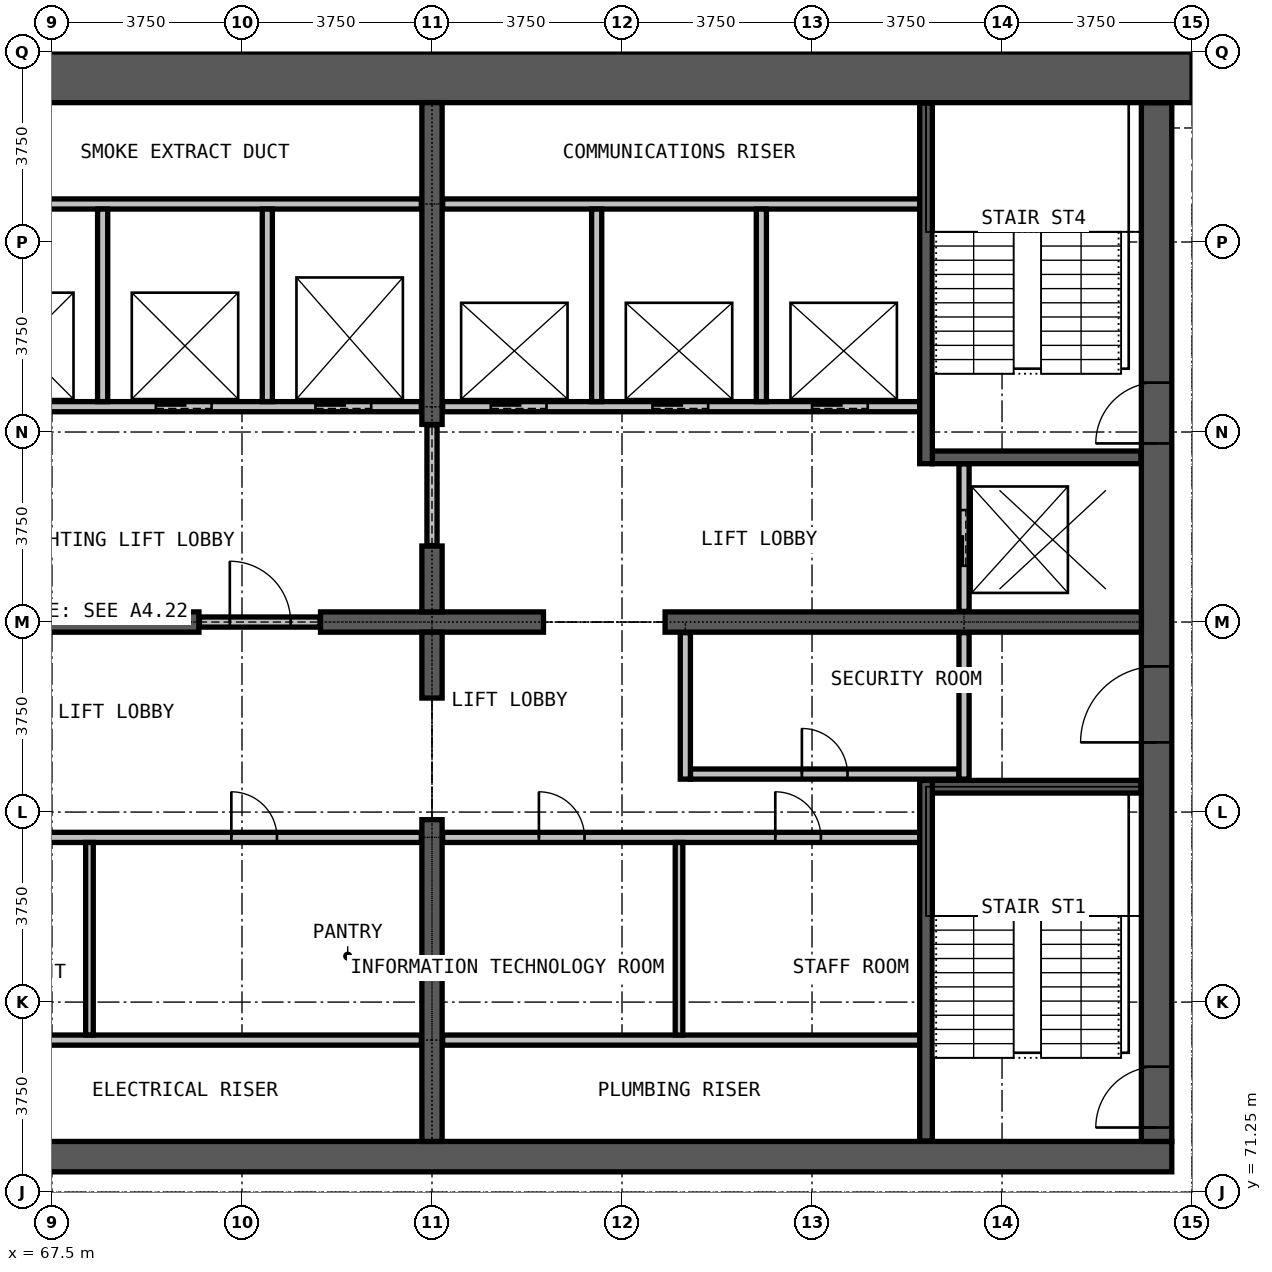
"""IFC4 building model, lengths in metres.
Left out: names, types, materials, properties, quantities, classifications, styles, units other than length and angle.
Written with IfcOpenShell. Run it as: python <this file> out.ifc"""

import sys

from ifc_helpers import new_model, si_unit, direction, frame, frame_2d, origin, place, context, subcontext, project, spatial, rectangle, extrude, element, fill, save


model = new_model("IFC4")
c1 = context("Model", 3, precision=1e-05, world=origin(), true_north=direction((0.0, 1.0)))
c2 = subcontext(c1, "Body", "Model", "MODEL_VIEW")
j1 = project(units=[si_unit("LENGTHUNIT", "METRE"), si_unit("PLANEANGLEUNIT", "RADIAN")], contexts=[c1])
p1 = place(None, origin())
s1 = spatial("IfcSite", under=j1, at=p1, CompositionType="ELEMENT")
p2 = place(p1, origin())
s2 = spatial("IfcBuilding", under=s1, at=p2, CompositionType="ELEMENT")
p3 = place(p2, frame((0.0, 0.0, 213.9)))
s3 = spatial("IfcBuildingStorey", under=s2, at=p3, CompositionType="ELEMENT", Elevation=213.9)
p4 = place(p3, frame((60.4, 71.95, 0.0), z_axis=(0.0, 0.0, 1.0), x_axis=(1.0, 0.0, 0.0)))
e1 = element("IfcWall", 1, at=p4, inside=s3, PredefinedType="SHEAR", context=c2, shape_type="SweptSolid", body=[
    extrude(rectangle(XDim=29.2, YDim=0.6, at=frame_2d((14.6, 0.0))), origin(), (0.0, 0.0, 1.0), 3.6),
])
p5 = place(p3, frame((89.3, 72.25, 0.0), z_axis=(0.0, 0.0, 1.0), x_axis=(0.0, 1.0, 0.0)))
e2 = element("IfcWall", 2, at=p5, inside=s3, PredefinedType="SHEAR", context=c2, shape_type="SweptSolid", body=[
    extrude(rectangle(XDim=20.5, YDim=0.6, at=frame_2d((10.25, 0.0))), origin(), (0.0, 0.0, 1.0), 3.6),
])
p6 = place(p5, frame((0.275, 0.0, 0.0)))
e3 = element("IfcOpeningElement", 3, at=p6, cuts=e2, PredefinedType="OPENING", context=c2, shape_type="SweptSolid", body=[
    extrude(rectangle(XDim=1.2, YDim=2.2, at=frame_2d((0.6, 1.1))), frame((0.0, 0.31, 0.0), z_axis=(0.0, -1.0, 0.0), x_axis=(1.0, 0.0, 0.0)), (0.0, 0.0, 1.0), 0.62),
])
p7 = place(p5, frame((13.775, 0.0, 0.0)))
e4 = element("IfcOpeningElement", 4, at=p7, cuts=e2, PredefinedType="OPENING", context=c2, shape_type="SweptSolid", body=[
    extrude(rectangle(XDim=1.2, YDim=2.2, at=frame_2d((0.6, 1.1))), frame((0.0, 0.31, 0.0), z_axis=(0.0, -1.0, 0.0), x_axis=(1.0, 0.0, 0.0)), (0.0, 0.0, 1.0), 0.62),
])
p8 = place(p5, frame((7.875, 0.0, 0.0)))
e5 = element("IfcOpeningElement", 5, at=p8, cuts=e2, PredefinedType="OPENING", context=c2, shape_type="SweptSolid", body=[
    extrude(rectangle(XDim=1.5, YDim=2.2, at=frame_2d((0.75, 1.1))), frame((0.0, 0.31, 0.0), z_axis=(0.0, -1.0, 0.0), x_axis=(1.0, 0.0, 0.0)), (0.0, 0.0, 1.0), 0.62),
])
p9 = place(p3, frame((90.0, 93.25, 0.0), z_axis=(0.0, 0.0, 1.0), x_axis=(-1.0, 0.0, 0.0)))
e6 = element("IfcWall", 6, at=p9, inside=s3, PredefinedType="SHEAR", context=c2, shape_type="SweptSolid", body=[
    extrude(rectangle(XDim=30.0, YDim=1.0, at=frame_2d((15.0, 0.0))), origin(), (0.0, 0.0, 1.0), 3.6),
])
p10 = place(p3, frame((61.0, 82.5, 0.0), z_axis=(0.0, 0.0, 1.0), x_axis=(1.0, 0.0, 0.0)))
e7 = element("IfcWall", 7, at=p10, inside=s3, PredefinedType="SHEAR", context=c2, shape_type="SweptSolid", body=[
    extrude(rectangle(XDim=9.4, YDim=0.4, at=frame_2d((4.7, 0.0))), origin(), (0.0, 0.0, 1.0), 3.6),
])
p11 = place(p3, frame((72.8, 82.5, 0.0), z_axis=(0.0, 0.0, 1.0), x_axis=(1.0, 0.0, 0.0)))
e8 = element("IfcWall", 8, at=p11, inside=s3, PredefinedType="SHEAR", context=c2, shape_type="SweptSolid", body=[
    extrude(rectangle(XDim=4.4, YDim=0.4, at=frame_2d((2.2, 0.0))), origin(), (0.0, 0.0, 1.0), 3.6),
])
p12 = place(p3, frame((79.6, 82.5, 0.0), z_axis=(0.0, 0.0, 1.0), x_axis=(1.0, 0.0, 0.0)))
e9 = element("IfcWall", 9, at=p12, inside=s3, PredefinedType="SHEAR", context=c2, shape_type="SweptSolid", body=[
    extrude(rectangle(XDim=9.4, YDim=0.4, at=frame_2d((4.7, 0.0))), origin(), (0.0, 0.0, 1.0), 3.6),
])
p13 = place(p3, frame((75.0, 72.25, 0.0), z_axis=(0.0, 0.0, 1.0), x_axis=(0.0, 1.0, 0.0)))
e10 = element("IfcWall", 10, at=p13, inside=s3, PredefinedType="SHEAR", context=c2, shape_type="SweptSolid", body=[
    extrude(rectangle(XDim=6.35, YDim=0.4, at=frame_2d((3.175, 0.0))), origin(), (0.0, 0.0, 1.0), 3.6),
])
for number, where, z_axis, x_axis in (
    (11, (75.0, 81.0, 0.0), (0.0, 0.0, 1.0), (0.0, 1.0, 0.0)),
    (12, (75.0, 82.7, 0.0), (0.0, 0.0, 1.0), (0.0, 1.0, 0.0)),
):
    element("IfcWall", number, at=place(p3, frame(where, z_axis=z_axis, x_axis=x_axis)), inside=s3, PredefinedType="SHEAR", context=c2, shape_type="SweptSolid", body=[
        extrude(rectangle(XDim=1.3, YDim=0.4, at=frame_2d((0.65, 0.0))), origin(), (0.0, 0.0, 1.0), 3.6),
    ])
p14 = place(p3, frame((75.0, 86.4, 0.0), z_axis=(0.0, 0.0, 1.0), x_axis=(0.0, 1.0, 0.0)))
e13 = element("IfcWall", 13, at=p14, inside=s3, PredefinedType="SHEAR", context=c2, shape_type="SweptSolid", body=[
    extrude(rectangle(XDim=6.35, YDim=0.4, at=frame_2d((3.175, 0.0))), origin(), (0.0, 0.0, 1.0), 3.6),
])
for number, where, z_axis, x_axis in (
    (14, (65.375, 74.25, 0.0), (0.0, 0.0, 1.0), (1.0, 0.0, 0.0)),
    (15, (75.21, 74.25, 0.0), (0.0, 0.0, 1.0), (1.0, 0.0, 0.0)),
):
    element("IfcWall", number, at=place(p3, frame(where, z_axis=z_axis, x_axis=x_axis)), inside=s3, PredefinedType="PARTITIONING", context=c2, shape_type="SweptSolid", body=[
        extrude(rectangle(XDim=9.415, YDim=0.2, at=frame_2d((4.708, 0.0))), origin(), (0.0, 0.0, 1.0), 3.3),
    ])
p15 = place(p3, frame((65.375, 78.25, 0.0), z_axis=(0.0, 0.0, 1.0), x_axis=(1.0, 0.0, 0.0)))
e16 = element("IfcWall", 16, at=p15, inside=s3, PredefinedType="PARTITIONING", context=c2, shape_type="SweptSolid", body=[
    extrude(rectangle(XDim=9.415, YDim=0.2, at=frame_2d((4.708, 0.0))), origin(), (0.0, 0.0, 1.0), 3.3),
])
p16 = place(p15, frame((1.0, 0.0, 0.0)))
e17 = element("IfcOpeningElement", 17, at=p16, cuts=e16, PredefinedType="OPENING", context=c2, shape_type="SweptSolid", body=[
    extrude(rectangle(XDim=0.9, YDim=2.2, at=frame_2d((0.45, 1.1))), frame((0.0, 0.11, 0.0), z_axis=(0.0, -1.0, 0.0), x_axis=(1.0, 0.0, 0.0)), (0.0, 0.0, 1.0), 0.22),
])
p17 = place(p15, frame((5.665, 0.0, 0.0)))
e18 = element("IfcOpeningElement", 18, at=p17, cuts=e16, PredefinedType="OPENING", context=c2, shape_type="SweptSolid", body=[
    extrude(rectangle(XDim=0.9, YDim=2.2, at=frame_2d((0.45, 1.1))), frame((0.0, 0.11, 0.0), z_axis=(0.0, -1.0, 0.0), x_axis=(1.0, 0.0, 0.0)), (0.0, 0.0, 1.0), 0.22),
])
p18 = place(p3, frame((75.21, 78.25, 0.0), z_axis=(0.0, 0.0, 1.0), x_axis=(1.0, 0.0, 0.0)))
e19 = element("IfcWall", 19, at=p18, inside=s3, PredefinedType="PARTITIONING", context=c2, shape_type="SweptSolid", body=[
    extrude(rectangle(XDim=9.415, YDim=0.2, at=frame_2d((4.708, 0.0))), origin(), (0.0, 0.0, 1.0), 3.3),
])
p19 = place(p18, frame((1.9, 0.0, 0.0)))
e20 = element("IfcOpeningElement", 20, at=p19, cuts=e19, PredefinedType="OPENING", context=c2, shape_type="SweptSolid", body=[
    extrude(rectangle(XDim=0.9, YDim=2.2, at=frame_2d((0.45, 1.1))), frame((0.0, 0.11, 0.0), z_axis=(0.0, -1.0, 0.0), x_axis=(1.0, 0.0, 0.0)), (0.0, 0.0, 1.0), 0.22),
])
p20 = place(p18, frame((6.565, 0.0, 0.0)))
e21 = element("IfcOpeningElement", 21, at=p20, cuts=e19, PredefinedType="OPENING", context=c2, shape_type="SweptSolid", body=[
    extrude(rectangle(XDim=0.9, YDim=2.2, at=frame_2d((0.45, 1.1))), frame((0.0, 0.11, 0.0), z_axis=(0.0, -1.0, 0.0), x_axis=(1.0, 0.0, 0.0)), (0.0, 0.0, 1.0), 0.22),
])
p21 = place(p3, frame((80.1, 79.5, 0.0), z_axis=(0.0, 0.0, 1.0), x_axis=(1.0, 0.0, 0.0)))
e22 = element("IfcWall", 22, at=p21, inside=s3, PredefinedType="PARTITIONING", context=c2, shape_type="SweptSolid", body=[
    extrude(rectangle(XDim=5.3, YDim=0.2, at=frame_2d((2.65, 0.0))), origin(), (0.0, 0.0, 1.0), 3.3),
])
p22 = place(p21, frame((2.2, 0.0, 0.0)))
e23 = element("IfcOpeningElement", 23, at=p22, cuts=e22, PredefinedType="OPENING", context=c2, shape_type="SweptSolid", body=[
    extrude(rectangle(XDim=0.9, YDim=2.2, at=frame_2d((0.45, 1.1))), frame((0.0, 0.11, 0.0), z_axis=(0.0, -1.0, 0.0), x_axis=(1.0, 0.0, 0.0)), (0.0, 0.0, 1.0), 0.22),
])
p23 = place(p3, frame((70.41, 82.5, 0.0), z_axis=(0.0, 0.0, 1.0), x_axis=(1.0, 0.0, 0.0)))
e24 = element("IfcWall", 24, at=p23, inside=s3, PredefinedType="PARTITIONING", context=c2, shape_type="SweptSolid", body=[
    extrude(rectangle(XDim=2.38, YDim=0.2, at=frame_2d((1.19, 0.0))), origin(), (0.0, 0.0, 1.0), 2.4),
])
p24 = place(p23, frame((0.6, 0.0, 0.0)))
e25 = element("IfcOpeningElement", 25, at=p24, cuts=e24, PredefinedType="OPENING", context=c2, shape_type="SweptSolid", body=[
    extrude(rectangle(XDim=1.2, YDim=2.2, at=frame_2d((0.6, 1.1))), frame((0.0, 0.11, 0.0), z_axis=(0.0, -1.0, 0.0), x_axis=(1.0, 0.0, 0.0)), (0.0, 0.0, 1.0), 0.22),
])
p25 = place(p3, frame((75.0, 84.01, 0.0), z_axis=(0.0, 0.0, 1.0), x_axis=(0.0, 1.0, 0.0)))
e26 = element("IfcWall", 26, at=p25, inside=s3, PredefinedType="PARTITIONING", context=c2, shape_type="SweptSolid", body=[
    extrude(rectangle(XDim=2.38, YDim=0.2, at=frame_2d((1.19, 0.0))), origin(), (0.0, 0.0, 1.0), 2.4),
])
for number, where, z_axis, x_axis in (
    (27, (80.0, 79.4, 0.0), (0.0, 0.0, 1.0), (0.0, 1.0, 0.0)),
    (28, (85.5, 79.4, 0.0), (0.0, 0.0, 1.0), (0.0, 1.0, 0.0)),
):
    element("IfcWall", number, at=place(p3, frame(where, z_axis=z_axis, x_axis=x_axis)), inside=s3, PredefinedType="PARTITIONING", context=c2, shape_type="SweptSolid", body=[
        extrude(rectangle(XDim=2.89, YDim=0.2, at=frame_2d((1.445, 0.0))), origin(), (0.0, 0.0, 1.0), 3.3),
    ])
for number, where, z_axis, x_axis in (
    (29, (68.24, 74.35, 0.0), (0.0, 0.0, 1.0), (0.0, 1.0, 0.0)),
    (30, (79.875, 74.35, 0.0), (0.0, 0.0, 1.0), (0.0, 1.0, 0.0)),
):
    element("IfcWall", number, at=place(p3, frame(where, z_axis=z_axis, x_axis=x_axis)), inside=s3, PredefinedType="PARTITIONING", context=c2, shape_type="SweptSolid", body=[
        extrude(rectangle(XDim=3.8, YDim=0.15, at=frame_2d((1.9, 0.0))), origin(), (0.0, 0.0, 1.0), 3.3),
    ])
p26 = place(p3, frame((65.375, 86.75, 0.0), z_axis=(0.0, 0.0, 1.0), x_axis=(1.0, 0.0, 0.0)))
e31 = element("IfcWall", 31, at=p26, inside=s3, PredefinedType="PARTITIONING", context=c2, shape_type="SweptSolid", body=[
    extrude(rectangle(XDim=9.415, YDim=0.2, at=frame_2d((4.708, 0.0))), origin(), (0.0, 0.0, 1.0), 3.3),
])
p27 = place(p26, frame((1.0, 0.0, 0.0)))
e32 = element("IfcOpeningElement", 32, at=p27, cuts=e31, PredefinedType="OPENING", context=c2, shape_type="SweptSolid", body=[
    extrude(rectangle(XDim=1.1, YDim=2.2, at=frame_2d((0.55, 1.1))), frame((0.0, 0.11, 0.0), z_axis=(0.0, -1.0, 0.0), x_axis=(1.0, 0.0, 0.0)), (0.0, 0.0, 1.0), 0.22),
])
p28 = place(p26, frame((4.175, 0.0, 0.0)))
e33 = element("IfcOpeningElement", 33, at=p28, cuts=e31, PredefinedType="OPENING", context=c2, shape_type="SweptSolid", body=[
    extrude(rectangle(XDim=1.1, YDim=2.2, at=frame_2d((0.55, 1.1))), frame((0.0, 0.11, 0.0), z_axis=(0.0, -1.0, 0.0), x_axis=(1.0, 0.0, 0.0)), (0.0, 0.0, 1.0), 0.22),
])
p29 = place(p26, frame((7.325, 0.0, 0.0)))
e34 = element("IfcOpeningElement", 34, at=p29, cuts=e31, PredefinedType="OPENING", context=c2, shape_type="SweptSolid", body=[
    extrude(rectangle(XDim=1.1, YDim=2.2, at=frame_2d((0.55, 1.1))), frame((0.0, 0.11, 0.0), z_axis=(0.0, -1.0, 0.0), x_axis=(1.0, 0.0, 0.0)), (0.0, 0.0, 1.0), 0.22),
])
p30 = place(p3, frame((75.21, 86.75, 0.0), z_axis=(0.0, 0.0, 1.0), x_axis=(1.0, 0.0, 0.0)))
e35 = element("IfcWall", 35, at=p30, inside=s3, PredefinedType="PARTITIONING", context=c2, shape_type="SweptSolid", body=[
    extrude(rectangle(XDim=9.415, YDim=0.2, at=frame_2d((4.708, 0.0))), origin(), (0.0, 0.0, 1.0), 3.3),
])
p31 = place(p30, frame((0.95, 0.0, 0.0)))
e36 = element("IfcOpeningElement", 36, at=p31, cuts=e35, PredefinedType="OPENING", context=c2, shape_type="SweptSolid", body=[
    extrude(rectangle(XDim=1.1, YDim=2.2, at=frame_2d((0.55, 1.1))), frame((0.0, 0.11, 0.0), z_axis=(0.0, -1.0, 0.0), x_axis=(1.0, 0.0, 0.0)), (0.0, 0.0, 1.0), 0.22),
])
p32 = place(p30, frame((4.14, 0.0, 0.0)))
e37 = element("IfcOpeningElement", 37, at=p32, cuts=e35, PredefinedType="OPENING", context=c2, shape_type="SweptSolid", body=[
    extrude(rectangle(XDim=1.1, YDim=2.2, at=frame_2d((0.55, 1.1))), frame((0.0, 0.11, 0.0), z_axis=(0.0, -1.0, 0.0), x_axis=(1.0, 0.0, 0.0)), (0.0, 0.0, 1.0), 0.22),
])
p33 = place(p30, frame((7.29, 0.0, 0.0)))
e38 = element("IfcOpeningElement", 38, at=p33, cuts=e35, PredefinedType="OPENING", context=c2, shape_type="SweptSolid", body=[
    extrude(rectangle(XDim=1.1, YDim=2.2, at=frame_2d((0.55, 1.1))), frame((0.0, 0.11, 0.0), z_axis=(0.0, -1.0, 0.0), x_axis=(1.0, 0.0, 0.0)), (0.0, 0.0, 1.0), 0.22),
])
for number, where, z_axis, x_axis in (
    (39, (65.375, 90.75, 0.0), (0.0, 0.0, 1.0), (1.0, 0.0, 0.0)),
    (40, (75.21, 90.75, 0.0), (0.0, 0.0, 1.0), (1.0, 0.0, 0.0)),
):
    element("IfcWall", number, at=place(p3, frame(where, z_axis=z_axis, x_axis=x_axis)), inside=s3, PredefinedType="PARTITIONING", context=c2, shape_type="SweptSolid", body=[
        extrude(rectangle(XDim=9.415, YDim=0.2, at=frame_2d((4.708, 0.0))), origin(), (0.0, 0.0, 1.0), 3.3),
    ])
for number, where, z_axis, x_axis in (
    (41, (68.5, 86.85, 0.0), (0.0, 0.0, 1.0), (0.0, 1.0, 0.0)),
    (42, (71.75, 86.85, 0.0), (0.0, 0.0, 1.0), (0.0, 1.0, 0.0)),
    (43, (78.25, 86.85, 0.0), (0.0, 0.0, 1.0), (0.0, 1.0, 0.0)),
    (44, (81.5, 86.85, 0.0), (0.0, 0.0, 1.0), (0.0, 1.0, 0.0)),
):
    element("IfcWall", number, at=place(p3, frame(where, z_axis=z_axis, x_axis=x_axis)), inside=s3, PredefinedType="PARTITIONING", context=c2, shape_type="SweptSolid", body=[
        extrude(rectangle(XDim=3.8, YDim=0.2, at=frame_2d((1.9, 0.0))), origin(), (0.0, 0.0, 1.0), 3.3),
    ])
p34 = place(p3, frame((85.5, 82.71, 0.0), z_axis=(0.0, 0.0, 1.0), x_axis=(0.0, 1.0, 0.0)))
e45 = element("IfcWall", 45, at=p34, inside=s3, PredefinedType="PARTITIONING", context=c2, shape_type="SweptSolid", body=[
    extrude(rectangle(XDim=2.915, YDim=0.2, at=frame_2d((1.458, 0.0))), origin(), (0.0, 0.0, 1.0), 3.3),
])
p35 = place(p34, frame((0.9, 0.0, 0.0)))
e46 = element("IfcOpeningElement", 46, at=p35, cuts=e45, PredefinedType="OPENING", context=c2, shape_type="SweptSolid", body=[
    extrude(rectangle(XDim=1.1, YDim=2.2, at=frame_2d((0.55, 1.1))), frame((0.0, 0.11, 0.0), z_axis=(0.0, -1.0, 0.0), x_axis=(1.0, 0.0, 0.0)), (0.0, 0.0, 1.0), 0.22),
])
for number, where, z_axis, x_axis in (
    (47, (84.875, 79.25, 0.0), (0.0, 0.0, 1.0), (1.0, 0.0, 0.0)),
    (48, (84.875, 85.75, 0.0), (0.0, 0.0, 1.0), (1.0, 0.0, 0.0)),
):
    element("IfcWall", number, at=place(p3, frame(where, z_axis=z_axis, x_axis=x_axis)), inside=s3, PredefinedType="PARTITIONING", context=c2, shape_type="SweptSolid", body=[
        extrude(rectangle(XDim=4.115, YDim=0.25, at=frame_2d((2.058, 0.0))), origin(), (0.0, 0.0, 1.0), 3.3),
    ])
for number, where, z_axis, x_axis in (
    (49, (84.75, 72.26, 0.0), (0.0, 0.0, 1.0), (0.0, 1.0, 0.0)),
    (50, (84.75, 85.625, 0.0), (0.0, 0.0, 1.0), (0.0, 1.0, 0.0)),
):
    element("IfcWall", number, at=place(p3, frame(where, z_axis=z_axis, x_axis=x_axis)), inside=s3, PredefinedType="PARTITIONING", context=c2, shape_type="SweptSolid", body=[
        extrude(rectangle(XDim=7.115, YDim=0.25, at=frame_2d((3.558, 0.0))), origin(), (0.0, 0.0, 1.0), 3.3),
    ])
p36 = place(p31, origin())
e51 = element("IfcDoor", 51, at=p36, inside=s3, OperationType="DOUBLE_DOOR_SLIDING", PredefinedType="DOOR", context=c2, shape_type="SweptSolid", body=[
    extrude(rectangle(XDim=1.1, YDim=2.2, at=frame_2d((0.55, 1.1))), frame((0.0, 0.025, 0.0), z_axis=(0.0, -1.0, 0.0), x_axis=(1.0, 0.0, 0.0)), (0.0, 0.0, 1.0), 0.05),
])
fill(e36, e51)
p37 = place(p32, origin())
e52 = element("IfcDoor", 52, at=p37, inside=s3, OperationType="DOUBLE_DOOR_SLIDING", PredefinedType="DOOR", context=c2, shape_type="SweptSolid", body=[
    extrude(rectangle(XDim=1.1, YDim=2.2, at=frame_2d((0.55, 1.1))), frame((0.0, 0.025, 0.0), z_axis=(0.0, -1.0, 0.0), x_axis=(1.0, 0.0, 0.0)), (0.0, 0.0, 1.0), 0.05),
])
fill(e37, e52)
p38 = place(p33, origin())
e53 = element("IfcDoor", 53, at=p38, inside=s3, OperationType="DOUBLE_DOOR_SLIDING", PredefinedType="DOOR", context=c2, shape_type="SweptSolid", body=[
    extrude(rectangle(XDim=1.1, YDim=2.2, at=frame_2d((0.55, 1.1))), frame((0.0, 0.025, 0.0), z_axis=(0.0, -1.0, 0.0), x_axis=(1.0, 0.0, 0.0)), (0.0, 0.0, 1.0), 0.05),
])
fill(e38, e53)
p39 = place(p28, origin())
e54 = element("IfcDoor", 54, at=p39, inside=s3, OperationType="DOUBLE_DOOR_SLIDING", PredefinedType="DOOR", context=c2, shape_type="SweptSolid", body=[
    extrude(rectangle(XDim=1.1, YDim=2.2, at=frame_2d((0.55, 1.1))), frame((0.0, 0.025, 0.0), z_axis=(0.0, -1.0, 0.0), x_axis=(1.0, 0.0, 0.0)), (0.0, 0.0, 1.0), 0.05),
])
fill(e33, e54)
p40 = place(p29, origin())
e55 = element("IfcDoor", 55, at=p40, inside=s3, OperationType="DOUBLE_DOOR_SLIDING", PredefinedType="DOOR", context=c2, shape_type="SweptSolid", body=[
    extrude(rectangle(XDim=1.1, YDim=2.2, at=frame_2d((0.55, 1.1))), frame((0.0, 0.025, 0.0), z_axis=(0.0, -1.0, 0.0), x_axis=(1.0, 0.0, 0.0)), (0.0, 0.0, 1.0), 0.05),
])
fill(e34, e55)
p41 = place(p35, origin())
e56 = element("IfcDoor", 56, at=p41, inside=s3, OperationType="DOUBLE_DOOR_SLIDING", PredefinedType="DOOR", context=c2, shape_type="SweptSolid", body=[
    extrude(rectangle(XDim=1.1, YDim=2.2, at=frame_2d((0.55, 1.1))), frame((0.0, 0.025, 0.0), z_axis=(0.0, -1.0, 0.0), x_axis=(1.0, 0.0, 0.0)), (0.0, 0.0, 1.0), 0.05),
])
fill(e46, e56)
p42 = place(p24, origin())
e57 = element("IfcDoor", 57, at=p42, inside=s3, OperationType="SINGLE_SWING_LEFT", PredefinedType="DOOR", context=c2, shape_type="SweptSolid", body=[
    extrude(rectangle(XDim=1.2, YDim=2.2, at=frame_2d((0.6, 1.1))), frame((0.0, 0.025, 0.0), z_axis=(0.0, -1.0, 0.0), x_axis=(1.0, 0.0, 0.0)), (0.0, 0.0, 1.0), 0.05),
])
fill(e25, e57)
p43 = place(p6, origin())
e58 = element("IfcDoor", 58, at=p43, inside=s3, OperationType="SINGLE_SWING_LEFT", PredefinedType="DOOR", context=c2, shape_type="SweptSolid", body=[
    extrude(rectangle(XDim=1.2, YDim=2.2, at=frame_2d((0.6, 1.1))), frame((0.0, 0.025, 0.0), z_axis=(0.0, -1.0, 0.0), x_axis=(1.0, 0.0, 0.0)), (0.0, 0.0, 1.0), 0.05),
])
fill(e3, e58)
p44 = place(p7, origin())
e59 = element("IfcDoor", 59, at=p44, inside=s3, OperationType="SINGLE_SWING_RIGHT", PredefinedType="DOOR", context=c2, shape_type="SweptSolid", body=[
    extrude(rectangle(XDim=1.2, YDim=2.2, at=frame_2d((0.6, 1.1))), frame((0.0, 0.025, 0.0), z_axis=(0.0, -1.0, 0.0), x_axis=(1.0, 0.0, 0.0)), (0.0, 0.0, 1.0), 0.05),
])
fill(e4, e59)
p45 = place(p8, origin())
e60 = element("IfcDoor", 60, at=p45, inside=s3, OperationType="DOUBLE_DOOR_SINGLE_SWING", PredefinedType="DOOR", context=c2, shape_type="SweptSolid", body=[
    extrude(rectangle(XDim=1.5, YDim=2.2, at=frame_2d((0.75, 1.1))), frame((0.0, 0.025, 0.0), z_axis=(0.0, -1.0, 0.0), x_axis=(1.0, 0.0, 0.0)), (0.0, 0.0, 1.0), 0.05),
])
fill(e5, e60)
p46 = place(p22, origin())
e61 = element("IfcDoor", 61, at=p46, inside=s3, OperationType="SINGLE_SWING_LEFT", PredefinedType="DOOR", context=c2, shape_type="SweptSolid", body=[
    extrude(rectangle(XDim=0.9, YDim=2.2, at=frame_2d((0.45, 1.1))), frame((0.0, 0.025, 0.0), z_axis=(0.0, -1.0, 0.0), x_axis=(1.0, 0.0, 0.0)), (0.0, 0.0, 1.0), 0.05),
])
fill(e23, e61)
p47 = place(p17, origin())
e62 = element("IfcDoor", 62, at=p47, inside=s3, OperationType="SINGLE_SWING_LEFT", PredefinedType="DOOR", context=c2, shape_type="SweptSolid", body=[
    extrude(rectangle(XDim=0.9, YDim=2.2, at=frame_2d((0.45, 1.1))), frame((0.0, 0.025, 0.0), z_axis=(0.0, -1.0, 0.0), x_axis=(1.0, 0.0, 0.0)), (0.0, 0.0, 1.0), 0.05),
])
fill(e18, e62)
p48 = place(p19, origin())
e63 = element("IfcDoor", 63, at=p48, inside=s3, OperationType="SINGLE_SWING_LEFT", PredefinedType="DOOR", context=c2, shape_type="SweptSolid", body=[
    extrude(rectangle(XDim=0.9, YDim=2.2, at=frame_2d((0.45, 1.1))), frame((0.0, 0.025, 0.0), z_axis=(0.0, -1.0, 0.0), x_axis=(1.0, 0.0, 0.0)), (0.0, 0.0, 1.0), 0.05),
])
fill(e20, e63)
p49 = place(p20, origin())
e64 = element("IfcDoor", 64, at=p49, inside=s3, OperationType="SINGLE_SWING_RIGHT", PredefinedType="DOOR", context=c2, shape_type="SweptSolid", body=[
    extrude(rectangle(XDim=0.9, YDim=2.2, at=frame_2d((0.45, 1.1))), frame((0.0, 0.025, 0.0), z_axis=(0.0, -1.0, 0.0), x_axis=(1.0, 0.0, 0.0)), (0.0, 0.0, 1.0), 0.05),
])
fill(e21, e64)
save(model, sys.argv[1])
